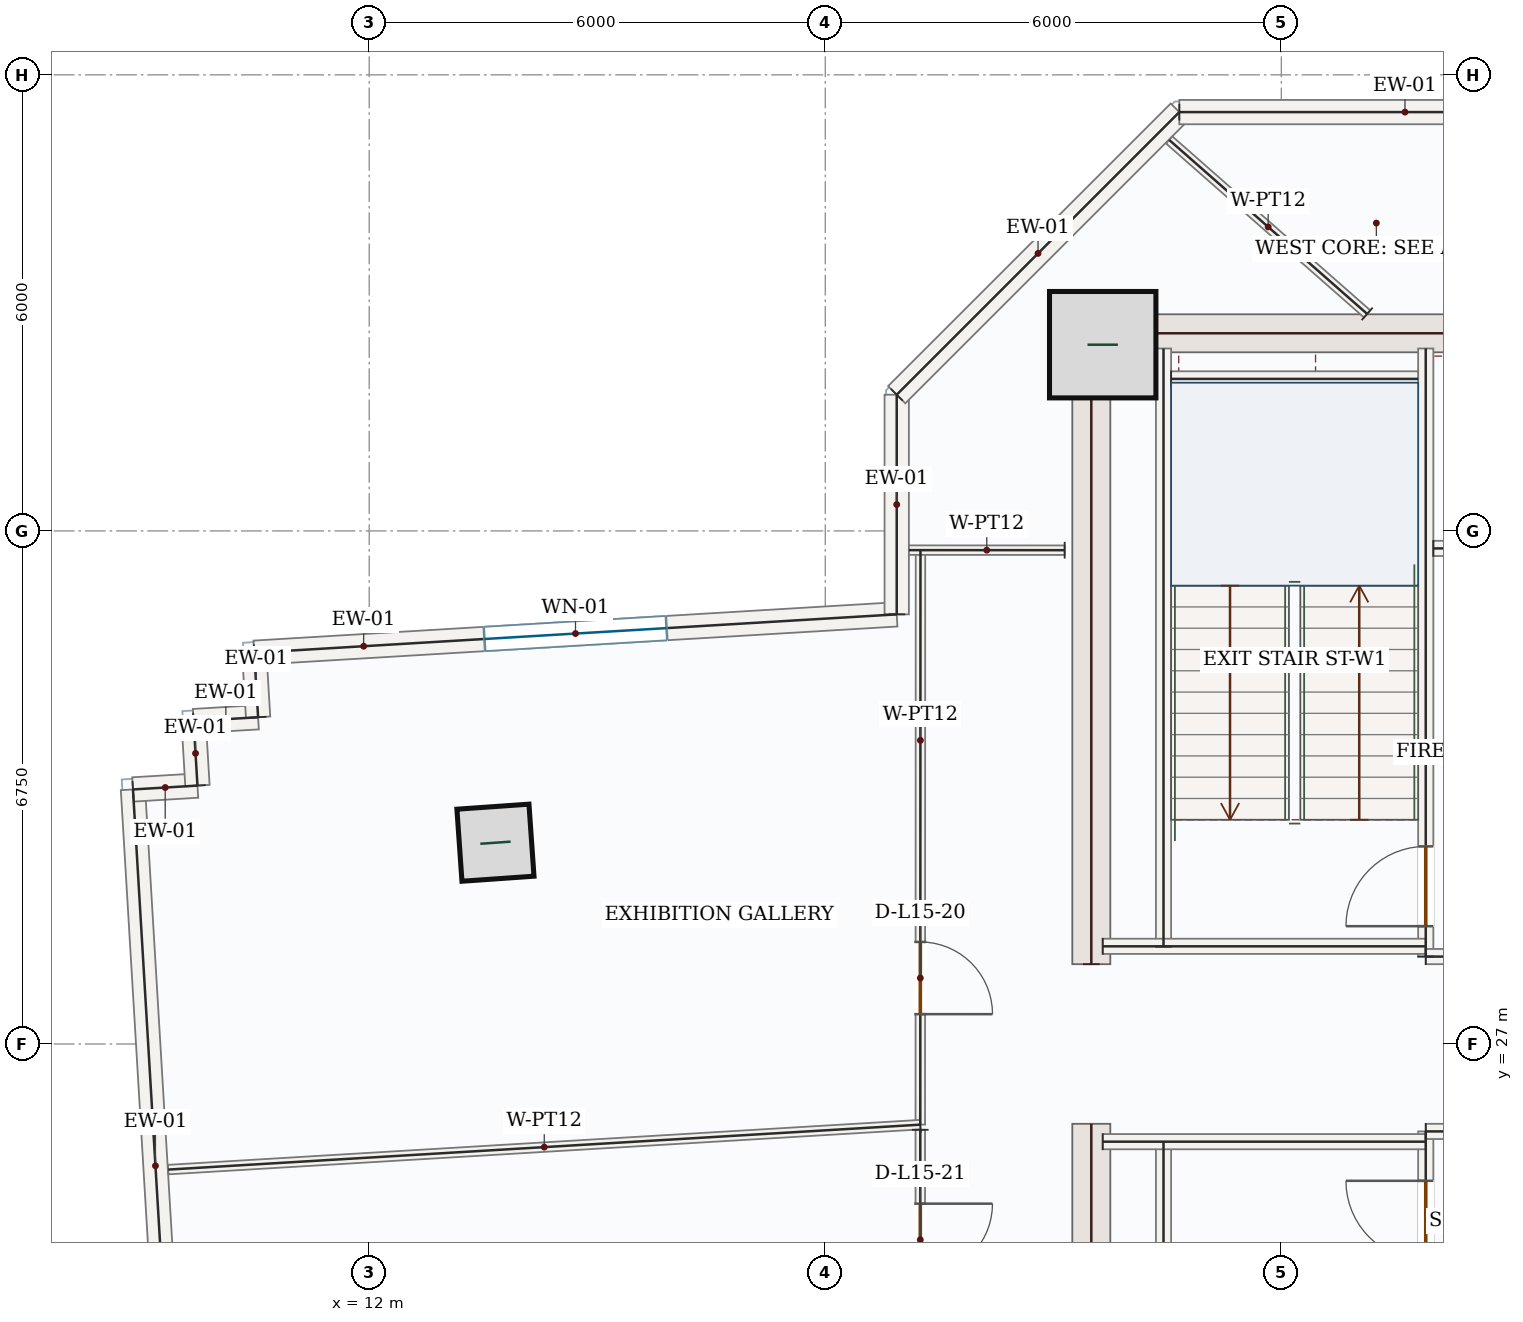
"""IFC4 building model, lengths in metres.
Left out: names, types, materials, properties, quantities, classifications, styles, units other than length and angle.
Written with IfcOpenShell. Run it as: python <this file> out.ifc"""

import sys

from ifc_helpers import new_model, si_unit, direction, frame, frame_2d, origin, origin_2d, place, context, subcontext, project, spatial, rectangle, hollow_rectangle, extrude, source, transform, mapped, element, fill, save


model = new_model("IFC4")
c1 = context("Model", 3, precision=1e-05, world=origin(), true_north=direction((0.0, 1.0)))
c2 = subcontext(c1, "Body", "Model", "MODEL_VIEW")
j1 = project(units=[si_unit("LENGTHUNIT", "METRE"), si_unit("PLANEANGLEUNIT", "RADIAN")], contexts=[c1])
p1 = place(None, origin())
s1 = spatial("IfcSite", under=j1, at=p1, CompositionType="ELEMENT")
p2 = place(p1, origin())
s2 = spatial("IfcBuilding", under=s1, at=p2, CompositionType="ELEMENT")
p3 = place(p2, frame((0.0, 0.0, 71.1)))
s3 = spatial("IfcBuildingStorey", under=s2, at=p3, CompositionType="ELEMENT", Elevation=71.1)
m1 = source(origin(), c2, "Body", "SweptSolid", [
    extrude(rectangle(XDim=8.55, YDim=0.5, at=frame_2d((4.275, 0.0))), origin(), (0.0, 0.0, 1.0), 3.95),
])
for number, where, z_axis, x_axis in (
    (1, (21.5, 17.4, 0.0), (0.0, 0.0, 1.0), (0.0, 1.0, 0.0)),
    (2, (21.5, 28.05, 0.0), (0.0, 0.0, 1.0), (0.0, 1.0, 0.0)),
):
    element("IfcWall", number, at=place(p3, frame(where, z_axis=z_axis, x_axis=x_axis)), inside=s3, PredefinedType="SHEAR", context=c2, shape_type="MappedRepresentation", body=[
        mapped(m1, transform((0.0, 0.0, 0.0), x_axis=(1.0, 0.0, 0.0), y_axis=(0.0, 1.0, 0.0), z_axis=(0.0, 0.0, 1.0), scale=1.0)),
    ])
m2 = source(origin(), c2, "Body", "SweptSolid", [
    extrude(rectangle(XDim=7.0, YDim=0.5, at=frame_2d((3.5, 0.0))), origin(), (0.0, 0.0, 1.0), 3.95),
])
p4 = place(p3, frame((21.75, 36.35, 0.0), z_axis=(0.0, 0.0, 1.0), x_axis=(1.0, 0.0, 0.0)))
e3 = element("IfcWall", 3, at=p4, inside=s3, PredefinedType="SHEAR", context=c2, shape_type="MappedRepresentation", body=[
    mapped(m2, transform((0.0, 0.0, 0.0), x_axis=(1.0, 0.0, 0.0), y_axis=(0.0, 1.0, 0.0), z_axis=(0.0, 0.0, 1.0), scale=1.0)),
])
m3 = source(origin(), c2, "Body", "SweptSolid", [
    extrude(rectangle(XDim=1.4, YDim=1.4, at=origin_2d()), origin(), (0.0, 0.0, 1.0), 4.2),
])
p5 = place(p3, frame((21.65, 36.2, 0.0), z_axis=(0.0, 0.0, 1.0), x_axis=(1.0, 0.0, 0.0)))
e4 = element("IfcColumn", 4, at=p5, inside=s3, PredefinedType="COLUMN", context=c2, shape_type="MappedRepresentation", body=[
    mapped(m3, transform((0.0, 0.0, 0.0), x_axis=(1.0, 0.0, 0.0), y_axis=(0.0, 1.0, 0.0), z_axis=(0.0, 0.0, 1.0), scale=1.0)),
])
m4 = source(origin(), c2, "Body", "SweptSolid", [
    extrude(hollow_rectangle(XDim=0.95, YDim=0.95, WallThickness=0.05, at=origin_2d()), origin(), (0.0, 0.0, 1.0), 4.2),
])
p6 = place(p3, frame((13.661, 29.648, 0.0), z_axis=(0.0, 0.0, 1.0), x_axis=(0.99756405026, 0.069756473744, 0.0)))
e5 = element("IfcColumn", 5, at=p6, inside=s3, PredefinedType="COLUMN", context=c2, shape_type="MappedRepresentation", body=[
    mapped(m4, transform((0.0, 0.0, 0.0), x_axis=(1.0, 0.0, 0.0), y_axis=(0.0, 1.0, 0.0), z_axis=(0.0, 0.0, 1.0), scale=1.0)),
])
m5 = source(origin(), c2, "Body", "SweptSolid", [
    extrude(rectangle(XDim=9.92, YDim=0.32, at=frame_2d((4.96, 0.0))), origin(), (0.0, 0.0, 1.0), 3.95),
])
p7 = place(p3, frame((9.484, 20.447, 0.0), z_axis=(0.0, 0.0, 1.0), x_axis=(-0.059656871726, 0.998218942745, 0.0)))
e6 = element("IfcWall", 6, at=p7, inside=s3, PredefinedType="SOLIDWALL", context=c2, shape_type="MappedRepresentation", body=[
    mapped(m5, transform((0.0, 0.0, 0.0), x_axis=(1.0, 0.0, 0.0), y_axis=(0.0, 1.0, 0.0), z_axis=(0.0, 0.0, 1.0), scale=1.0)),
])
m6 = source(origin(), c2, "Body", "SweptSolid", [
    extrude(rectangle(XDim=0.85, YDim=0.32, at=frame_2d((0.425, 0.0))), origin(), (0.0, 0.0, 1.0), 3.95),
])
for number, where, z_axis, x_axis in (
    (7, (8.892, 30.349, 0.0), (0.0, 0.0, 1.0), (0.998, 0.059, 0.0)),
    (8, (9.74, 30.399, 0.0), (0.0, 0.0, 1.0), (-0.06, 0.998, 0.0)),
):
    element("IfcWall", number, at=place(p3, frame(where, z_axis=z_axis, x_axis=x_axis)), inside=s3, PredefinedType="SOLIDWALL", context=c2, shape_type="MappedRepresentation", body=[
        mapped(m6, transform((0.0, 0.0, 0.0), x_axis=(1.0, 0.0, 0.0), y_axis=(0.0, 1.0, 0.0), z_axis=(0.0, 0.0, 1.0), scale=1.0)),
    ])
m7 = source(origin(), c2, "Body", "SweptSolid", [
    extrude(rectangle(XDim=0.85, YDim=0.32, at=frame_2d((0.425, 0.0))), origin(), (0.0, 0.0, 1.0), 3.95),
])
p8 = place(p3, frame((9.69, 31.248, 0.0), z_axis=(0.0, 0.0, 1.0), x_axis=(0.998230513845, 0.059462939961, 0.0)))
e9 = element("IfcWall", 9, at=p8, inside=s3, PredefinedType="SOLIDWALL", context=c2, shape_type="MappedRepresentation", body=[
    mapped(m7, transform((0.0, 0.0, 0.0), x_axis=(1.0, 0.0, 0.0), y_axis=(0.0, 1.0, 0.0), z_axis=(0.0, 0.0, 1.0), scale=1.0)),
])
p9 = place(p3, frame((10.538, 31.299, 0.0), z_axis=(0.0, 0.0, 1.0), x_axis=(-0.059445893707, 0.998231529116, 0.0)))
e10 = element("IfcWall", 10, at=p9, inside=s3, PredefinedType="SOLIDWALL", context=c2, shape_type="MappedRepresentation", body=[
    mapped(m6, transform((0.0, 0.0, 0.0), x_axis=(1.0, 0.0, 0.0), y_axis=(0.0, 1.0, 0.0), z_axis=(0.0, 0.0, 1.0), scale=1.0)),
])
p10 = place(p3, frame((10.488, 32.147, 0.0), z_axis=(0.0, 0.0, 1.0), x_axis=(0.998219055518, 0.059654984716, 0.0)))
e11 = element("IfcWall", 11, at=p10, inside=s3, PredefinedType="SOLIDWALL", context=c2, shape_type="SweptSolid", body=[
    extrude(rectangle(XDim=8.468, YDim=0.32, at=frame_2d((4.234, 0.0))), origin(), (0.0, 0.0, 1.0), 3.95),
])
p11 = place(p10, frame((3.034, 0.0, 0.85)))
e12 = element("IfcOpeningElement", 12, at=p11, cuts=e11, PredefinedType="OPENING", context=c2, shape_type="SweptSolid", body=[
    extrude(rectangle(XDim=2.4, YDim=1.8, at=frame_2d((1.2, 0.9))), frame((0.0, 0.17, 0.0), z_axis=(0.0, -1.0, 0.0), x_axis=(1.0, 0.0, 0.0)), (0.0, 0.0, 1.0), 0.34),
])
m8 = source(origin(), c2, "Body", "SweptSolid", [
    extrude(rectangle(XDim=2.89, YDim=0.32, at=frame_2d((1.445, 0.0))), origin(), (0.0, 0.0, 1.0), 3.95),
])
p12 = place(p3, frame((18.94, 32.652, 0.0), z_axis=(0.0, 0.0, 1.0), x_axis=(0.0, 1.0, 0.0)))
e13 = element("IfcWall", 13, at=p12, inside=s3, PredefinedType="SOLIDWALL", context=c2, shape_type="MappedRepresentation", body=[
    mapped(m8, transform((0.0, 0.0, 0.0), x_axis=(1.0, 0.0, 0.0), y_axis=(0.0, 1.0, 0.0), z_axis=(0.0, 0.0, 1.0), scale=1.0)),
])
m9 = source(origin(), c2, "Body", "SweptSolid", [
    extrude(rectangle(XDim=5.258, YDim=0.32, at=frame_2d((2.629, 0.0))), origin(), (0.0, 0.0, 1.0), 3.95),
])
p13 = place(p3, frame((18.94, 35.542, 0.0), z_axis=(0.0, 0.0, 1.0), x_axis=(0.707106781187, 0.707106781187, 0.0)))
e14 = element("IfcWall", 14, at=p13, inside=s3, PredefinedType="SOLIDWALL", context=c2, shape_type="MappedRepresentation", body=[
    mapped(m9, transform((0.0, 0.0, 0.0), x_axis=(1.0, 0.0, 0.0), y_axis=(0.0, 1.0, 0.0), z_axis=(0.0, 0.0, 1.0), scale=1.0)),
])
m10 = source(origin(), c2, "Body", "SweptSolid", [
    extrude(rectangle(XDim=5.938, YDim=0.32, at=frame_2d((2.969, 0.0))), origin(), (0.0, 0.0, 1.0), 3.95),
])
p14 = place(p3, frame((22.658, 39.26, 0.0), z_axis=(0.0, 0.0, 1.0), x_axis=(1.0, 0.0, 0.0)))
e15 = element("IfcWall", 15, at=p14, inside=s3, PredefinedType="SOLIDWALL", context=c2, shape_type="MappedRepresentation", body=[
    mapped(m10, transform((0.0, 0.0, 0.0), x_axis=(1.0, 0.0, 0.0), y_axis=(0.0, 1.0, 0.0), z_axis=(0.0, 0.0, 1.0), scale=1.0)),
])
m11 = source(origin(), c2, "Body", "SweptSolid", [
    extrude(rectangle(XDim=7.87, YDim=0.2, at=frame_2d((3.935, 0.0))), origin(), (0.0, 0.0, 1.0), 3.95),
])
for number, where, z_axis, x_axis in (
    (16, (22.45, 17.85, 0.0), (0.0, 0.0, 1.0), (0.0, 1.0, 0.0)),
    (17, (22.45, 28.28, 0.0), (0.0, 0.0, 1.0), (0.0, 1.0, 0.0)),
):
    element("IfcWall", number, at=place(p3, frame(where, z_axis=z_axis, x_axis=x_axis)), inside=s3, PredefinedType="SOLIDWALL", context=c2, shape_type="MappedRepresentation", body=[
        mapped(m11, transform((0.0, 0.0, 0.0), x_axis=(1.0, 0.0, 0.0), y_axis=(0.0, 1.0, 0.0), z_axis=(0.0, 0.0, 1.0), scale=1.0)),
    ])
p15 = place(p3, frame((25.9, 17.85, 0.0), z_axis=(0.0, 0.0, 1.0), x_axis=(0.0, 1.0, 0.0)))
e18 = element("IfcWall", 18, at=p15, inside=s3, PredefinedType="SOLIDWALL", context=c2, shape_type="SweptSolid", body=[
    extrude(rectangle(XDim=8.0, YDim=0.2, at=frame_2d((4.0, 0.0))), origin(), (0.0, 0.0, 1.0), 3.95),
])
p16 = place(p15, frame((6.3, 0.0, 0.0)))
e19 = element("IfcOpeningElement", 19, at=p16, cuts=e18, PredefinedType="OPENING", context=c2, shape_type="SweptSolid", body=[
    extrude(rectangle(XDim=1.05, YDim=2.15, at=frame_2d((0.525, 1.075))), frame((0.0, 0.11, 0.0), z_axis=(0.0, -1.0, 0.0), x_axis=(1.0, 0.0, 0.0)), (0.0, 0.0, 1.0), 0.22),
])
p17 = place(p3, frame((25.9, 28.15, 0.0), z_axis=(0.0, 0.0, 1.0), x_axis=(0.0, 1.0, 0.0)))
e20 = element("IfcWall", 20, at=p17, inside=s3, PredefinedType="SOLIDWALL", context=c2, shape_type="SweptSolid", body=[
    extrude(rectangle(XDim=8.0, YDim=0.2, at=frame_2d((4.0, 0.0))), origin(), (0.0, 0.0, 1.0), 3.95),
])
p18 = place(p17, frame((0.4, 0.0, 0.0)))
e21 = element("IfcOpeningElement", 21, at=p18, cuts=e20, PredefinedType="OPENING", context=c2, shape_type="SweptSolid", body=[
    extrude(rectangle(XDim=1.05, YDim=2.15, at=frame_2d((0.525, 1.075))), frame((0.0, 0.11, 0.0), z_axis=(0.0, -1.0, 0.0), x_axis=(1.0, 0.0, 0.0)), (0.0, 0.0, 1.0), 0.22),
])
m12 = source(origin(), c2, "Body", "SweptSolid", [
    extrude(rectangle(XDim=4.25, YDim=0.2, at=frame_2d((2.125, 0.0))), origin(), (0.0, 0.0, 1.0), 3.95),
])
p19 = place(p3, frame((21.65, 25.715, 0.0), z_axis=(0.0, 0.0, 1.0), x_axis=(1.0, 0.0, 0.0)))
e22 = element("IfcWall", 22, at=p19, inside=s3, PredefinedType="SOLIDWALL", context=c2, shape_type="MappedRepresentation", body=[
    mapped(m12, transform((0.0, 0.0, 0.0), x_axis=(1.0, 0.0, 0.0), y_axis=(0.0, 1.0, 0.0), z_axis=(0.0, 0.0, 1.0), scale=1.0)),
])
m13 = source(origin(), c2, "Body", "SweptSolid", [
    extrude(rectangle(XDim=3.0, YDim=0.2, at=frame_2d((1.5, 0.0))), origin(), (0.0, 0.0, 1.0), 3.95),
])
p20 = place(p3, frame((25.9, 25.85, 0.0), z_axis=(0.0, 0.0, 1.0), x_axis=(1.0, 0.0, 0.0)))
e23 = element("IfcWall", 23, at=p20, inside=s3, PredefinedType="SOLIDWALL", context=c2, shape_type="MappedRepresentation", body=[
    mapped(m13, transform((0.0, 0.0, 0.0), x_axis=(1.0, 0.0, 0.0), y_axis=(0.0, 1.0, 0.0), z_axis=(0.0, 0.0, 1.0), scale=1.0)),
])
p21 = place(p3, frame((21.65, 28.285, 0.0), z_axis=(0.0, 0.0, 1.0), x_axis=(1.0, 0.0, 0.0)))
e24 = element("IfcWall", 24, at=p21, inside=s3, PredefinedType="SOLIDWALL", context=c2, shape_type="MappedRepresentation", body=[
    mapped(m12, transform((0.0, 0.0, 0.0), x_axis=(1.0, 0.0, 0.0), y_axis=(0.0, 1.0, 0.0), z_axis=(0.0, 0.0, 1.0), scale=1.0)),
])
p22 = place(p3, frame((25.9, 28.15, 0.0), z_axis=(0.0, 0.0, 1.0), x_axis=(1.0, 0.0, 0.0)))
e25 = element("IfcWall", 25, at=p22, inside=s3, PredefinedType="SOLIDWALL", context=c2, shape_type="MappedRepresentation", body=[
    mapped(m13, transform((0.0, 0.0, 0.0), x_axis=(1.0, 0.0, 0.0), y_axis=(0.0, 1.0, 0.0), z_axis=(0.0, 0.0, 1.0), scale=1.0)),
])
m14 = source(origin(), c2, "Body", "SweptSolid", [
    extrude(rectangle(XDim=3.25, YDim=0.2, at=frame_2d((1.625, 0.0))), origin(), (0.0, 0.0, 1.0), 3.95),
])
p23 = place(p3, frame((22.55, 35.75, 0.0), z_axis=(0.0, 0.0, 1.0), x_axis=(1.0, 0.0, 0.0)))
e26 = element("IfcWall", 26, at=p23, inside=s3, PredefinedType="SOLIDWALL", context=c2, shape_type="MappedRepresentation", body=[
    mapped(m14, transform((0.0, 0.0, 0.0), x_axis=(1.0, 0.0, 0.0), y_axis=(0.0, 1.0, 0.0), z_axis=(0.0, 0.0, 1.0), scale=1.0)),
])
p24 = place(p3, frame((26.0, 33.52, 0.0), z_axis=(0.0, 0.0, 1.0), x_axis=(1.0, 0.0, 0.0)))
e27 = element("IfcWall", 27, at=p24, inside=s3, PredefinedType="SOLIDWALL", context=c2, shape_type="SweptSolid", body=[
    extrude(rectangle(XDim=2.75, YDim=0.2, at=frame_2d((1.375, 0.0))), origin(), (0.0, 0.0, 1.0), 3.95),
])
p25 = place(p24, frame((0.82, 0.0, 0.0)))
e28 = element("IfcOpeningElement", 28, at=p25, cuts=e27, PredefinedType="OPENING", context=c2, shape_type="SweptSolid", body=[
    extrude(rectangle(XDim=1.1, YDim=2.15, at=frame_2d((0.55, 1.075))), frame((0.0, 0.11, 0.0), z_axis=(0.0, -1.0, 0.0), x_axis=(1.0, 0.0, 0.0)), (0.0, 0.0, 1.0), 0.22),
])
m15 = source(origin(), c2, "Body", "SweptSolid", [
    extrude(rectangle(XDim=3.467, YDim=0.125, at=frame_2d((1.733, 0.0))), origin(), (0.0, 0.0, 1.0), 3.95),
])
p26 = place(p3, frame((25.129, 36.605, 0.0), z_axis=(0.0, 0.0, 1.0), x_axis=(-0.751135268809, 0.66014832269, 0.0)))
e29 = element("IfcWall", 29, at=p26, inside=s3, PredefinedType="PARTITIONING", context=c2, shape_type="MappedRepresentation", body=[
    mapped(m15, transform((0.0, 0.0, 0.0), x_axis=(1.0, 0.0, 0.0), y_axis=(0.0, 1.0, 0.0), z_axis=(0.0, 0.0, 1.0), scale=1.0)),
])
p27 = place(p3, frame((19.253, 33.497, 0.0), z_axis=(0.0, 0.0, 1.0), x_axis=(-0.000355308612, -0.999999936878, 0.0)))
e30 = element("IfcWall", 30, at=p27, inside=s3, PredefinedType="PARTITIONING", context=c2, shape_type="SweptSolid", body=[
    extrude(rectangle(XDim=7.558, YDim=0.125, at=frame_2d((3.779, 0.0))), origin(), (0.0, 0.0, 1.0), 3.95),
])
p28 = place(p27, frame((5.155, 0.0, 0.0)))
e31 = element("IfcOpeningElement", 31, at=p28, cuts=e30, PredefinedType="OPENING", context=c2, shape_type="SweptSolid", body=[
    extrude(rectangle(XDim=0.95, YDim=2.15, at=frame_2d((0.475, 1.075))), frame((0.0, 0.073, 0.0), z_axis=(0.0, -1.0, 0.0), x_axis=(1.0, 0.0, 0.0)), (0.0, 0.0, 1.0), 0.145),
])
m16 = source(origin(), c2, "Body", "SweptSolid", [
    extrude(rectangle(XDim=9.911, YDim=0.125, at=frame_2d((4.956, 0.0))), origin(), (0.0, 0.0, 1.0), 3.95),
])
p29 = place(p3, frame((19.25, 25.939, 0.0), z_axis=(0.0, 0.0, 1.0), x_axis=(-0.998218808208, -0.05965912285, 0.0)))
e32 = element("IfcWall", 32, at=p29, inside=s3, PredefinedType="PARTITIONING", context=c2, shape_type="MappedRepresentation", body=[
    mapped(m16, transform((0.0, 0.0, 0.0), x_axis=(1.0, 0.0, 0.0), y_axis=(0.0, 1.0, 0.0), z_axis=(0.0, 0.0, 1.0), scale=1.0)),
])
m17 = source(origin(), c2, "Body", "SweptSolid", [
    extrude(rectangle(XDim=2.049, YDim=0.125, at=frame_2d((1.025, 0.0))), origin(), (0.0, 0.0, 1.0), 3.95),
])
p30 = place(p3, frame((21.149, 33.497, 0.0), z_axis=(0.0, 0.0, 1.0), x_axis=(-0.999999936133, 0.000357398119, 0.0)))
e33 = element("IfcWall", 33, at=p30, inside=s3, PredefinedType="PARTITIONING", context=c2, shape_type="MappedRepresentation", body=[
    mapped(m17, transform((0.0, 0.0, 0.0), x_axis=(1.0, 0.0, 0.0), y_axis=(0.0, 1.0, 0.0), z_axis=(0.0, 0.0, 1.0), scale=1.0)),
])
p31 = place(p3, frame((19.25, 25.871, 0.0), z_axis=(0.0, 0.0, 1.0), x_axis=(9.0962841e-05, -0.999999995863, 0.0)))
e34 = element("IfcWall", 34, at=p31, inside=s3, PredefinedType="PARTITIONING", context=c2, shape_type="SweptSolid", body=[
    extrude(rectangle(XDim=5.368, YDim=0.125, at=frame_2d((2.684, 0.0))), origin(), (0.0, 0.0, 1.0), 3.95),
])
p32 = place(p31, frame((0.972, 0.0, 0.0)))
e35 = element("IfcOpeningElement", 35, at=p32, cuts=e34, PredefinedType="OPENING", context=c2, shape_type="SweptSolid", body=[
    extrude(rectangle(XDim=0.95, YDim=2.15, at=frame_2d((0.475, 1.075))), frame((0.0, 0.073, 0.0), z_axis=(0.0, -1.0, 0.0), x_axis=(1.0, 0.0, 0.0)), (0.0, 0.0, 1.0), 0.145),
])
m18 = source(origin(), c2, "Body", "SweptSolid", [
    extrude(rectangle(XDim=2.4, YDim=1.8, at=frame_2d((1.2, 0.9))), frame((0.0, 0.03, 0.0), z_axis=(0.0, -1.0, 0.0), x_axis=(1.0, 0.0, 0.0)), (0.0, 0.0, 1.0), 0.06),
])
p33 = place(p11, origin())
e36 = element("IfcWindow", 36, at=p33, inside=s3, PartitioningType="DOUBLE_PANEL_VERTICAL", PredefinedType="WINDOW", context=c2, shape_type="MappedRepresentation", body=[
    mapped(m18, transform((0.0, 0.0, 0.0), x_axis=(1.0, 0.0, 0.0), y_axis=(0.0, 1.0, 0.0), z_axis=(0.0, 0.0, 1.0), scale=1.0)),
])
fill(e12, e36)
m19 = source(origin(), c2, "Body", "SweptSolid", [
    extrude(rectangle(XDim=1.05, YDim=2.15, at=frame_2d((0.525, 1.075))), frame((0.0, 0.025, 0.0), z_axis=(0.0, -1.0, 0.0), x_axis=(1.0, 0.0, 0.0)), (0.0, 0.0, 1.0), 0.05),
])
p34 = place(p18, origin())
e37 = element("IfcDoor", 37, at=p34, inside=s3, OperationType="SINGLE_SWING_LEFT", PredefinedType="DOOR", context=c2, shape_type="MappedRepresentation", body=[
    mapped(m19, transform((0.0, 0.0, 0.0), x_axis=(1.0, 0.0, 0.0), y_axis=(0.0, 1.0, 0.0), z_axis=(0.0, 0.0, 1.0), scale=1.0)),
])
fill(e21, e37)
p35 = place(p16, origin())
e38 = element("IfcDoor", 38, at=p35, inside=s3, OperationType="SINGLE_SWING_RIGHT", PredefinedType="DOOR", context=c2, shape_type="MappedRepresentation", body=[
    mapped(m19, transform((0.0, 0.0, 0.0), x_axis=(1.0, 0.0, 0.0), y_axis=(0.0, 1.0, 0.0), z_axis=(0.0, 0.0, 1.0), scale=1.0)),
])
fill(e19, e38)
m20 = source(origin(), c2, "Body", "SweptSolid", [
    extrude(rectangle(XDim=0.95, YDim=2.15, at=frame_2d((0.475, 1.075))), frame((0.0, 0.025, 0.0), z_axis=(0.0, -1.0, 0.0), x_axis=(1.0, 0.0, 0.0)), (0.0, 0.0, 1.0), 0.05),
])
p36 = place(p28, origin())
e39 = element("IfcDoor", 39, at=p36, inside=s3, OperationType="SINGLE_SWING_RIGHT", PredefinedType="DOOR", context=c2, shape_type="MappedRepresentation", body=[
    mapped(m20, transform((0.0, 0.0, 0.0), x_axis=(1.0, 0.0, 0.0), y_axis=(0.0, 1.0, 0.0), z_axis=(0.0, 0.0, 1.0), scale=1.0)),
])
fill(e31, e39)
p37 = place(p32, origin())
e40 = element("IfcDoor", 40, at=p37, inside=s3, OperationType="SINGLE_SWING_LEFT", PredefinedType="DOOR", context=c2, shape_type="MappedRepresentation", body=[
    mapped(m20, transform((0.0, 0.0, 0.0), x_axis=(1.0, 0.0, 0.0), y_axis=(0.0, 1.0, 0.0), z_axis=(0.0, 0.0, 1.0), scale=1.0)),
])
fill(e35, e40)
save(model, sys.argv[1])
